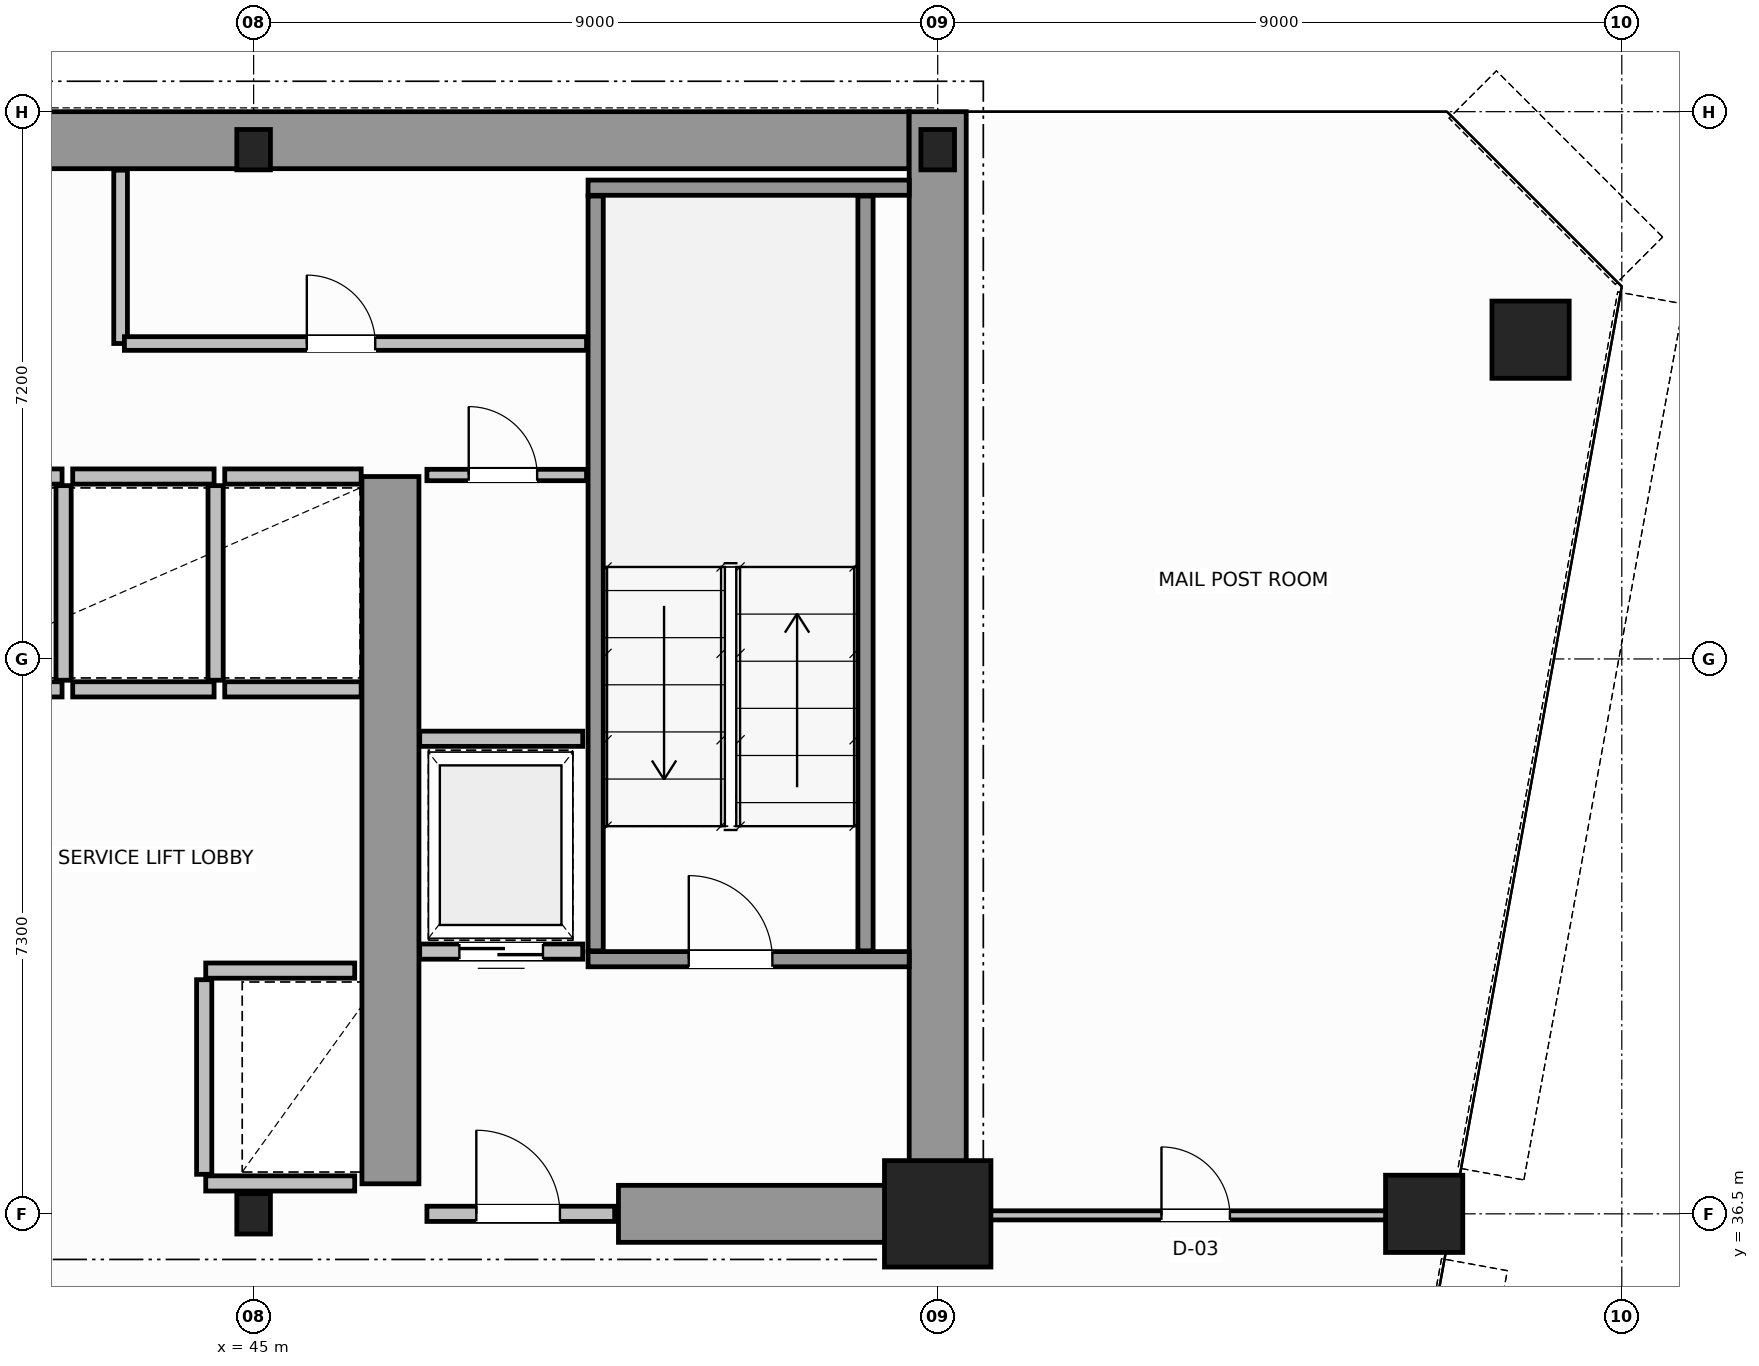
"""IFC4 building model, lengths in metres.
Left out: names, types, materials, properties, quantities, classifications, styles, units other than length and angle.
Written with IfcOpenShell. Run it as: python <this file> out.ifc"""

import sys

from ifc_helpers import new_model, si_unit, direction, frame, frame_2d, origin, origin_2d, place, context, subcontext, project, spatial, rectangle, hollow_circle, i_section, extrude, source, transform, mapped, element, fill, save


model = new_model("IFC4")
c1 = context("Model", 3, precision=1e-05, world=origin(), true_north=direction((0.0, 1.0)))
c2 = subcontext(c1, "Body", "Model", "MODEL_VIEW")
j1 = project(units=[si_unit("LENGTHUNIT", "METRE"), si_unit("PLANEANGLEUNIT", "RADIAN")], contexts=[c1])
p1 = place(None, origin())
s1 = spatial("IfcSite", under=j1, at=p1, CompositionType="ELEMENT")
p2 = place(p1, origin())
s2 = spatial("IfcBuilding", under=s1, at=p2, CompositionType="ELEMENT")
p3 = place(p2, frame((0.0, 0.0, 107.2)))
s3 = spatial("IfcBuildingStorey", under=s2, at=p3, CompositionType="ELEMENT", Elevation=107.2)
m1 = source(origin(), c2, "Body", "SweptSolid", [
    extrude(i_section(OverallWidth=0.442, OverallDepth=0.531, WebThickness=0.065, FlangeThickness=0.076, FilletRadius=0.015, at=origin_2d()), origin(), (0.0, 0.0, 1.0), 3.8),
])
p4 = place(p3, frame((45.0, 36.5, 0.0), z_axis=(0.0, 0.0, 1.0), x_axis=(1.0, 0.0, 0.0)))
e1 = element("IfcColumn", 1, at=p4, inside=s3, PredefinedType="COLUMN", context=c2, shape_type="MappedRepresentation", body=[
    mapped(m1, transform((0.0, 0.0, 0.0), scale=1.0)),
])
m2 = source(origin(), c2, "Body", "SweptSolid", [
    extrude(rectangle(XDim=1.4, YDim=1.4, at=origin_2d()), origin(), (0.0, 0.0, 1.0), 3.8),
])
p5 = place(p3, frame((54.0, 36.5, 0.0), z_axis=(0.0, 0.0, 1.0), x_axis=(1.0, 0.0, 0.0)))
e2 = element("IfcColumn", 2, at=p5, inside=s3, PredefinedType="COLUMN", context=c2, shape_type="MappedRepresentation", body=[
    mapped(m2, transform((0.0, 0.0, 0.0), scale=1.0)),
])
for number, where, z_axis, x_axis in (
    (3, (45.0, 50.5, 0.0), (0.0, 0.0, 1.0), (1.0, 0.0, 0.0)),
    (4, (54.0, 50.5, 0.0), (0.0, 0.0, 1.0), (1.0, 0.0, 0.0)),
):
    element("IfcColumn", number, at=place(p3, frame(where, z_axis=z_axis, x_axis=x_axis)), inside=s3, PredefinedType="COLUMN", context=c2, shape_type="MappedRepresentation", body=[
        mapped(m1, transform((0.0, 0.0, 0.0), scale=1.0)),
    ])
m3 = source(origin(), c2, "Body", "SweptSolid", [
    extrude(hollow_circle(Radius=0.508, WallThickness=0.045, at=origin_2d()), origin(), (0.0, 0.0, 1.0), 3.8),
])
for number, where, z_axis, x_axis in (
    (5, (61.8, 48.0, 0.0), (0.0, 0.0, 1.0), (1.0, 0.0, 0.0)),
    (6, (60.4, 36.5, 0.0), (0.0, 0.0, 1.0), (1.0, 0.0, 0.0)),
):
    element("IfcColumn", number, at=place(p3, frame(where, z_axis=z_axis, x_axis=x_axis)), inside=s3, PredefinedType="COLUMN", context=c2, shape_type="MappedRepresentation", body=[
        mapped(m3, transform((0.0, 0.0, 0.0), scale=1.0)),
    ])
p6 = place(p3, frame((34.002, 50.625, 0.0), z_axis=(0.0, 0.0, 1.0), x_axis=(1.0, 0.0, 0.0)))
e7 = element("IfcWall", 7, at=p6, inside=s3, PredefinedType="SHEAR", context=c2, shape_type="SweptSolid", body=[
    extrude(rectangle(XDim=19.619, YDim=0.75, at=frame_2d((9.81, 0.0))), origin(), (0.0, 0.0, 1.0), 3.8),
])
p7 = place(p3, frame((54.0, 36.5, 0.0), z_axis=(0.0, 0.0, 1.0), x_axis=(0.0, 1.0, 0.0)))
e8 = element("IfcWall", 8, at=p7, inside=s3, PredefinedType="SHEAR", context=c2, shape_type="SweptSolid", body=[
    extrude(rectangle(XDim=14.5, YDim=0.75, at=frame_2d((7.25, 0.0))), origin(), (0.0, 0.0, 1.0), 3.8),
])
p8 = place(p3, frame((49.8, 36.5, 0.0), z_axis=(0.0, 0.0, 1.0), x_axis=(1.0, 0.0, 0.0)))
e9 = element("IfcWall", 9, at=p8, inside=s3, PredefinedType="SHEAR", context=c2, shape_type="SweptSolid", body=[
    extrude(rectangle(XDim=3.805, YDim=0.75, at=frame_2d((1.902, 0.0))), origin(), (0.0, 0.0, 1.0), 2.38),
])
p9 = place(p3, frame((46.8, 36.895, 0.0), z_axis=(0.0, 0.0, 1.0), x_axis=(0.0, 1.0, 0.0)))
e10 = element("IfcWall", 10, at=p9, inside=s3, PredefinedType="SHEAR", context=c2, shape_type="SweptSolid", body=[
    extrude(rectangle(XDim=9.305, YDim=0.75, at=frame_2d((4.652, 0.0))), origin(), (0.0, 0.0, 1.0), 3.8),
])
p10 = place(p3, frame((49.4, 39.85, 0.0), z_axis=(0.0, 0.0, 1.0), x_axis=(1.0, 0.0, 0.0)))
e11 = element("IfcWall", 11, at=p10, inside=s3, PredefinedType="SOLIDWALL", context=c2, shape_type="SweptSolid", body=[
    extrude(rectangle(XDim=4.225, YDim=0.2, at=frame_2d((2.113, 0.0))), origin(), (0.0, 0.0, 1.0), 3.8),
])
p11 = place(p10, frame((1.325, 0.0, 0.0)))
e12 = element("IfcOpeningElement", 12, at=p11, cuts=e11, PredefinedType="OPENING", context=c2, shape_type="SweptSolid", body=[
    extrude(rectangle(XDim=1.1, YDim=2.15, at=frame_2d((0.55, 1.075))), frame((0.0, 0.11, 0.0), z_axis=(0.0, -1.0, 0.0), x_axis=(1.0, 0.0, 0.0)), (0.0, 0.0, 1.0), 0.22),
])
p12 = place(p3, frame((49.4, 50.0, 0.0), z_axis=(0.0, 0.0, 1.0), x_axis=(1.0, 0.0, 0.0)))
e13 = element("IfcWall", 13, at=p12, inside=s3, PredefinedType="SOLIDWALL", context=c2, shape_type="SweptSolid", body=[
    extrude(rectangle(XDim=4.225, YDim=0.2, at=frame_2d((2.113, 0.0))), origin(), (0.0, 0.0, 1.0), 3.8),
])
for number, where, z_axis, x_axis in (
    (14, (49.5, 39.96, 0.0), (0.0, 0.0, 1.0), (0.0, 1.0, 0.0)),
    (15, (53.05, 39.96, 0.0), (0.0, 0.0, 1.0), (0.0, 1.0, 0.0)),
):
    element("IfcWall", number, at=place(p3, frame(where, z_axis=z_axis, x_axis=x_axis)), inside=s3, PredefinedType="SOLIDWALL", context=c2, shape_type="SweptSolid", body=[
        extrude(rectangle(XDim=9.93, YDim=0.2, at=frame_2d((4.965, 0.0))), origin(), (0.0, 0.0, 1.0), 3.8),
    ])
p13 = place(p3, frame((47.28, 36.5, 0.0), z_axis=(0.0, 0.0, 1.0), x_axis=(1.0, 0.0, 0.0)))
e16 = element("IfcWall", 16, at=p13, inside=s3, PredefinedType="SOLIDWALL", context=c2, shape_type="SweptSolid", body=[
    extrude(rectangle(XDim=2.47, YDim=0.2, at=frame_2d((1.235, 0.0))), origin(), (0.0, 0.0, 1.0), 2.37),
])
p14 = place(p13, frame((0.65, 0.0, 0.0)))
e17 = element("IfcOpeningElement", 17, at=p14, cuts=e16, PredefinedType="OPENING", context=c2, shape_type="SweptSolid", body=[
    extrude(rectangle(XDim=1.1, YDim=2.15, at=frame_2d((0.55, 1.075))), frame((0.0, 0.11, 0.0), z_axis=(0.0, -1.0, 0.0), x_axis=(1.0, 0.0, 0.0)), (0.0, 0.0, 1.0), 0.22),
])
p15 = place(p3, frame((44.37, 39.7, 0.0), z_axis=(0.0, 0.0, 1.0), x_axis=(1.0, 0.0, 0.0)))
e18 = element("IfcWall", 18, at=p15, inside=s3, PredefinedType="SOLIDWALL", context=c2, shape_type="SweptSolid", body=[
    extrude(rectangle(XDim=1.96, YDim=0.2, at=frame_2d((0.98, 0.0))), origin(), (0.0, 0.0, 1.0), 3.58),
])
p16 = place(p3, frame((44.37, 36.9, 0.0), z_axis=(0.0, 0.0, 1.0), x_axis=(1.0, 0.0, 0.0)))
e19 = element("IfcWall", 19, at=p16, inside=s3, PredefinedType="SOLIDWALL", context=c2, shape_type="SweptSolid", body=[
    extrude(rectangle(XDim=1.96, YDim=0.2, at=frame_2d((0.98, 0.0))), origin(), (0.0, 0.0, 1.0), 2.37),
])
p17 = place(p3, frame((44.35, 37.02, 0.0), z_axis=(0.0, 0.0, 1.0), x_axis=(0.0, 1.0, 0.0)))
e20 = element("IfcWall", 20, at=p17, inside=s3, PredefinedType="SOLIDWALL", context=c2, shape_type="SweptSolid", body=[
    extrude(rectangle(XDim=2.56, YDim=0.2, at=frame_2d((1.28, 0.0))), origin(), (0.0, 0.0, 1.0), 3.58),
])
for number, where, z_axis, x_axis in (
    (21, (40.62, 43.4, 0.0), (0.0, 0.0, 1.0), (1.0, 0.0, 0.0)),
    (22, (40.62, 46.2, 0.0), (0.0, 0.0, 1.0), (1.0, 0.0, 0.0)),
):
    element("IfcWall", number, at=place(p3, frame(where, z_axis=z_axis, x_axis=x_axis)), inside=s3, PredefinedType="SOLIDWALL", context=c2, shape_type="SweptSolid", body=[
        extrude(rectangle(XDim=1.86, YDim=0.2, at=frame_2d((0.93, 0.0))), origin(), (0.0, 0.0, 1.0), 3.58),
    ])
p18 = place(p3, frame((42.5, 43.52, 0.0), z_axis=(0.0, 0.0, 1.0), x_axis=(0.0, 1.0, 0.0)))
e23 = element("IfcWall", 23, at=p18, inside=s3, PredefinedType="SOLIDWALL", context=c2, shape_type="SweptSolid", body=[
    extrude(rectangle(XDim=2.56, YDim=0.2, at=frame_2d((1.28, 0.0))), origin(), (0.0, 0.0, 1.0), 3.58),
])
for number, where, z_axis, x_axis in (
    (24, (42.62, 43.4, 0.0), (0.0, 0.0, 1.0), (1.0, 0.0, 0.0)),
    (25, (42.62, 46.2, 0.0), (0.0, 0.0, 1.0), (1.0, 0.0, 0.0)),
):
    element("IfcWall", number, at=place(p3, frame(where, z_axis=z_axis, x_axis=x_axis)), inside=s3, PredefinedType="SOLIDWALL", context=c2, shape_type="SweptSolid", body=[
        extrude(rectangle(XDim=1.86, YDim=0.2, at=frame_2d((0.93, 0.0))), origin(), (0.0, 0.0, 1.0), 3.58),
    ])
p19 = place(p3, frame((44.5, 43.52, 0.0), z_axis=(0.0, 0.0, 1.0), x_axis=(0.0, 1.0, 0.0)))
e26 = element("IfcWall", 26, at=p19, inside=s3, PredefinedType="SOLIDWALL", context=c2, shape_type="SweptSolid", body=[
    extrude(rectangle(XDim=2.56, YDim=0.2, at=frame_2d((1.28, 0.0))), origin(), (0.0, 0.0, 1.0), 3.58),
])
for number, where, z_axis, x_axis in (
    (27, (44.62, 43.4, 0.0), (0.0, 0.0, 1.0), (1.0, 0.0, 0.0)),
    (28, (44.62, 46.2, 0.0), (0.0, 0.0, 1.0), (1.0, 0.0, 0.0)),
):
    element("IfcWall", number, at=place(p3, frame(where, z_axis=z_axis, x_axis=x_axis)), inside=s3, PredefinedType="SOLIDWALL", context=c2, shape_type="SweptSolid", body=[
        extrude(rectangle(XDim=1.795, YDim=0.2, at=frame_2d((0.897, 0.0))), origin(), (0.0, 0.0, 1.0), 3.58),
    ])
p20 = place(p3, frame((47.185, 39.95, 0.0), z_axis=(0.0, 0.0, 1.0), x_axis=(1.0, 0.0, 0.0)))
e29 = element("IfcWall", 29, at=p20, inside=s3, PredefinedType="SOLIDWALL", context=c2, shape_type="SweptSolid", body=[
    extrude(rectangle(XDim=2.145, YDim=0.2, at=frame_2d((1.073, 0.0))), origin(), (0.0, 0.0, 1.0), 3.58),
])
p21 = place(p20, frame((0.522, 0.0, 0.0)))
e30 = element("IfcOpeningElement", 30, at=p21, cuts=e29, PredefinedType="OPENING", context=c2, shape_type="SweptSolid", body=[
    extrude(rectangle(XDim=1.1, YDim=2.15, at=frame_2d((0.55, 1.075))), frame((0.0, 0.11, 0.0), z_axis=(0.0, -1.0, 0.0), x_axis=(1.0, 0.0, 0.0)), (0.0, 0.0, 1.0), 0.22),
])
p22 = place(p3, frame((47.185, 42.75, 0.0), z_axis=(0.0, 0.0, 1.0), x_axis=(1.0, 0.0, 0.0)))
e31 = element("IfcWall", 31, at=p22, inside=s3, PredefinedType="SOLIDWALL", context=c2, shape_type="SweptSolid", body=[
    extrude(rectangle(XDim=2.145, YDim=0.2, at=frame_2d((1.073, 0.0))), origin(), (0.0, 0.0, 1.0), 3.58),
])
p23 = place(p3, frame((47.28, 46.22, 0.0), z_axis=(0.0, 0.0, 1.0), x_axis=(1.0, 0.0, 0.0)))
e32 = element("IfcWall", 32, at=p23, inside=s3, PredefinedType="PARTITIONING", context=c2, shape_type="SweptSolid", body=[
    extrude(rectangle(XDim=2.1, YDim=0.15, at=frame_2d((1.05, 0.0))), origin(), (0.0, 0.0, 1.0), 3.58),
])
p24 = place(p23, frame((0.55, 0.0, 0.0)))
e33 = element("IfcOpeningElement", 33, at=p24, cuts=e32, PredefinedType="OPENING", context=c2, shape_type="SweptSolid", body=[
    extrude(rectangle(XDim=0.9, YDim=2.1, at=frame_2d((0.45, 1.05))), frame((0.0, 0.085, 0.0), z_axis=(0.0, -1.0, 0.0), x_axis=(1.0, 0.0, 0.0)), (0.0, 0.0, 1.0), 0.17),
])
p25 = place(p3, frame((43.25, 47.95, 0.0), z_axis=(0.0, 0.0, 1.0), x_axis=(0.0, 1.0, 0.0)))
e34 = element("IfcWall", 34, at=p25, inside=s3, PredefinedType="PLUMBINGWALL", context=c2, shape_type="SweptSolid", body=[
    extrude(rectangle(XDim=2.28, YDim=0.18, at=frame_2d((1.14, 0.0))), origin(), (0.0, 0.0, 1.0), 3.58),
])
p26 = place(p3, frame((43.3, 47.95, 0.0), z_axis=(0.0, 0.0, 1.0), x_axis=(1.0, 0.0, 0.0)))
e35 = element("IfcWall", 35, at=p26, inside=s3, PredefinedType="PLUMBINGWALL", context=c2, shape_type="SweptSolid", body=[
    extrude(rectangle(XDim=6.08, YDim=0.18, at=frame_2d((3.04, 0.0))), origin(), (0.0, 0.0, 1.0), 3.58),
])
p27 = place(p26, frame((2.4, 0.0, 0.0)))
e36 = element("IfcOpeningElement", 36, at=p27, cuts=e35, PredefinedType="OPENING", context=c2, shape_type="SweptSolid", body=[
    extrude(rectangle(XDim=0.9, YDim=2.15, at=frame_2d((0.45, 1.075))), frame((0.0, 0.1, 0.0), z_axis=(0.0, -1.0, 0.0), x_axis=(1.0, 0.0, 0.0)), (0.0, 0.0, 1.0), 0.2),
])
p28 = place(p3, frame((54.06, 36.48, 0.0), z_axis=(0.0, 0.0, 1.0), x_axis=(1.0, 0.0, 0.0)))
e37 = element("IfcWall", 37, at=p28, inside=s3, PredefinedType="PARTITIONING", context=c2, shape_type="SweptSolid", body=[
    extrude(rectangle(XDim=6.667, YDim=0.12, at=frame_2d((3.334, 0.0))), origin(), (0.0, 0.0, 1.0), 2.87),
])
p29 = place(p28, frame((2.884, 0.0, 0.0)))
e38 = element("IfcOpeningElement", 38, at=p29, cuts=e37, PredefinedType="OPENING", context=c2, shape_type="SweptSolid", body=[
    extrude(rectangle(XDim=0.9, YDim=2.15, at=frame_2d((0.45, 1.075))), frame((0.0, 0.07, 0.0), z_axis=(0.0, -1.0, 0.0), x_axis=(1.0, 0.0, 0.0)), (0.0, 0.0, 1.0), 0.14),
])
m4 = source(origin(), c2, "Body", "SweptSolid", [
    extrude(rectangle(XDim=1.1, YDim=2.15, at=frame_2d((0.55, 1.075))), frame((0.0, 0.025, 0.0), z_axis=(0.0, -1.0, 0.0), x_axis=(1.0, 0.0, 0.0)), (0.0, 0.0, 1.0), 0.05),
])
p30 = place(p11, origin())
e39 = element("IfcDoor", 39, at=p30, inside=s3, OperationType="SINGLE_SWING_RIGHT", PredefinedType="DOOR", context=c2, shape_type="MappedRepresentation", body=[
    mapped(m4, transform((0.0, 0.0, 0.0), scale=1.0)),
])
fill(e12, e39)
p31 = place(p14, origin())
e40 = element("IfcDoor", 40, at=p31, inside=s3, OperationType="SINGLE_SWING_LEFT", PredefinedType="DOOR", context=c2, shape_type="MappedRepresentation", body=[
    mapped(m4, transform((0.0, 0.0, 0.0), scale=1.0)),
])
fill(e17, e40)
p32 = place(p21, origin())
e41 = element("IfcDoor", 41, at=p32, inside=s3, OperationType="DOUBLE_DOOR_SLIDING", PredefinedType="DOOR", context=c2, shape_type="MappedRepresentation", body=[
    mapped(m4, transform((0.0, 0.0, 0.0), scale=1.0)),
])
fill(e30, e41)
m5 = source(origin(), c2, "Body", "SweptSolid", [
    extrude(rectangle(XDim=0.9, YDim=2.1, at=frame_2d((0.45, 1.05))), frame((0.0, 0.025, 0.0), z_axis=(0.0, -1.0, 0.0), x_axis=(1.0, 0.0, 0.0)), (0.0, 0.0, 1.0), 0.05),
])
p33 = place(p24, origin())
e42 = element("IfcDoor", 42, at=p33, inside=s3, OperationType="SINGLE_SWING_RIGHT", PredefinedType="DOOR", context=c2, shape_type="MappedRepresentation", body=[
    mapped(m5, transform((0.0, 0.0, 0.0), scale=1.0)),
])
fill(e33, e42)
m6 = source(origin(), c2, "Body", "SweptSolid", [
    extrude(rectangle(XDim=0.9, YDim=2.15, at=frame_2d((0.45, 1.075))), frame((0.0, 0.025, 0.0), z_axis=(0.0, -1.0, 0.0), x_axis=(1.0, 0.0, 0.0)), (0.0, 0.0, 1.0), 0.05),
])
p34 = place(p27, origin())
e43 = element("IfcDoor", 43, at=p34, inside=s3, OperationType="SINGLE_SWING_RIGHT", PredefinedType="DOOR", context=c2, shape_type="MappedRepresentation", body=[
    mapped(m6, transform((0.0, 0.0, 0.0), scale=1.0)),
])
fill(e36, e43)
p35 = place(p29, origin())
e44 = element("IfcDoor", 44, at=p35, inside=s3, OperationType="SINGLE_SWING_RIGHT", PredefinedType="DOOR", context=c2, shape_type="MappedRepresentation", body=[
    mapped(m6, transform((0.0, 0.0, 0.0), scale=1.0)),
])
fill(e38, e44)
save(model, sys.argv[1])
